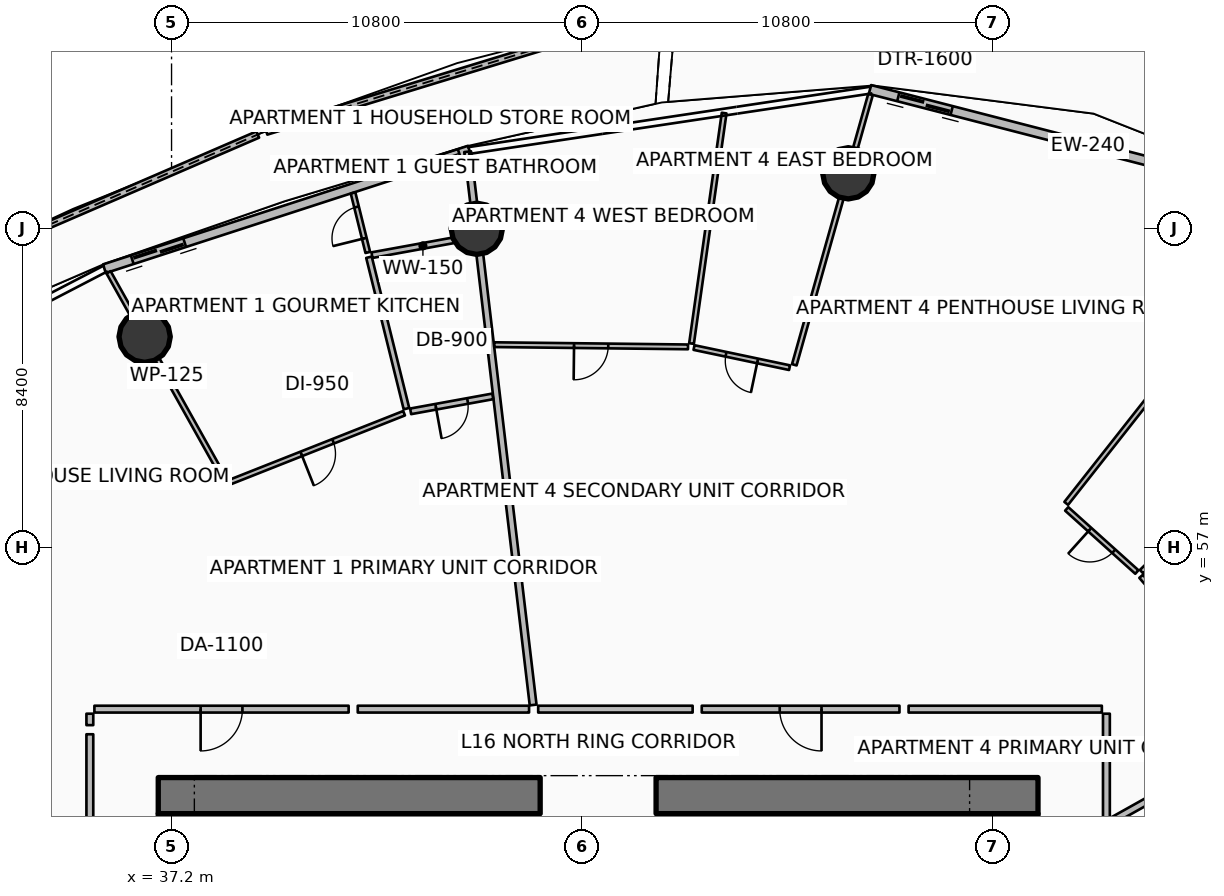
"""IFC4 building model, lengths in metres.
Left out: names, types, materials, properties, quantities, classifications, styles, units other than length and angle.
Written with IfcOpenShell. Run it as: python <this file> out.ifc"""

import sys

from ifc_helpers import new_model, si_unit, direction, frame, frame_2d, origin, origin_2d, place, context, subcontext, project, spatial, polyline, rectangle, circle, outline, extrude, element, fill, save


model = new_model("IFC4")
c1 = context("Model", 3, precision=1e-05, world=origin(), true_north=direction((0.0, 1.0)))
c2 = subcontext(c1, "Body", "Model", "MODEL_VIEW")
j1 = project(units=[si_unit("LENGTHUNIT", "METRE"), si_unit("PLANEANGLEUNIT", "RADIAN")], contexts=[c1])
p1 = place(None, origin())
s1 = spatial("IfcSite", under=j1, at=p1, CompositionType="ELEMENT")
p2 = place(p1, origin())
s2 = spatial("IfcBuilding", under=s1, at=p2, CompositionType="ELEMENT")
p3 = place(p2, frame((0.0, 0.0, 67.65)))
s3 = spatial("IfcBuildingStorey", under=s2, at=p3, CompositionType="ELEMENT", Elevation=67.65)
p4 = place(p3, frame((36.85, 50.475, 0.0), z_axis=(0.0, 0.0, 1.0), x_axis=(1.0, 0.0, 0.0)))
e1 = element("IfcWall", 1, at=p4, inside=s3, PredefinedType="SHEAR", context=c2, shape_type="SweptSolid", body=[
    extrude(rectangle(XDim=10.05, YDim=0.95, at=frame_2d((5.025, 0.0))), origin(), (0.0, 0.0, 1.0), 3.75),
])
p5 = place(p3, frame((49.95, 50.475, 0.0), z_axis=(0.0, 0.0, 1.0), x_axis=(1.0, 0.0, 0.0)))
e2 = element("IfcWall", 2, at=p5, inside=s3, PredefinedType="SHEAR", context=c2, shape_type="SweptSolid", body=[
    extrude(rectangle(XDim=10.05, YDim=0.95, at=frame_2d((5.025, 0.0))), origin(), (0.0, 0.0, 1.0), 3.75),
])
for number, where, z_axis, x_axis in (
    (3, (37.325, 34.0, 0.0), (0.0, 0.0, 1.0), (0.0, 1.0, 0.0)),
    (4, (59.525, 34.0, 0.0), (0.0, 0.0, 1.0), (0.0, 1.0, 0.0)),
):
    element("IfcWall", number, at=place(p3, frame(where, z_axis=z_axis, x_axis=x_axis)), inside=s3, PredefinedType="SHEAR", context=c2, shape_type="SweptSolid", body=[
        extrude(rectangle(XDim=16.0, YDim=0.95, at=frame_2d((8.0, 0.0))), origin(), (0.0, 0.0, 1.0), 3.75),
    ])
p6 = place(p3, frame((51.31, 46.5, 0.0), z_axis=(0.0, 0.0, 1.0), x_axis=(0.0, 1.0, 0.0)))
e5 = element("IfcWall", 5, at=p6, inside=s3, PredefinedType="SHEAR", context=c2, shape_type="SweptSolid", body=[
    extrude(rectangle(XDim=3.5, YDim=0.28, at=frame_2d((1.75, 0.0))), origin(), (0.0, 0.0, 1.0), 3.75),
])
for number, where, z_axis, x_axis in (
    (6, (55.008, 66.849, 0.0), (0.0, 0.0, 1.0), (1.0, 0.0, 0.0)),
    (7, (45.232, 65.389, 0.0), (0.0, 0.0, 1.0), (1.0, 0.0, 0.0)),
    (8, (36.492, 62.55, 0.0), (0.0, 0.0, 1.0), (1.0, 0.0, 0.0)),
):
    element("IfcColumn", number, at=place(p3, frame(where, z_axis=z_axis, x_axis=x_axis)), inside=s3, PredefinedType="COLUMN", context=c2, shape_type="SweptSolid", body=[
        extrude(circle(Radius=0.675, at=origin_2d()), origin(), (0.0, 0.0, 1.0), 3.35),
    ])
p7 = place(p3, frame((73.488, 64.039, 0.0), z_axis=(0.0, 0.0, 1.0), x_axis=(-0.851732671453, 0.523976579991, 0.0)))
e9 = element("IfcWall", 9, at=p7, inside=s3, PredefinedType="PARAPET", context=c2, shape_type="SweptSolid", body=[
    extrude(outline(polyline([(0.0, 0.0), (12.625, 0.0), (12.625, 1.832), (6.312, 1.696), (0.0, 1.497), (0.0, 0.0)])), frame((0.0, 0.09, 0.0), z_axis=(0.0, -1.0, 0.0), x_axis=(1.0, 0.0, 0.0)), (0.0, 0.0, 1.0), 0.18),
])
p8 = place(p3, frame((50.114, 71.14, 0.0), z_axis=(0.0, 0.0, 1.0), x_axis=(-0.956262130287, -0.292511090695, 0.0)))
e10 = element("IfcWall", 10, at=p8, inside=s3, PredefinedType="PARAPET", context=c2, shape_type="SweptSolid", body=[
    extrude(outline(polyline([(0.0, 0.0), (10.897, 0.0), (10.897, 1.348), (5.448, 1.562), (0.0, 1.747), (0.0, 0.0)])), frame((0.0, 0.09, 0.0), z_axis=(0.0, -1.0, 0.0), x_axis=(1.0, 0.0, 0.0)), (0.0, 0.0, 1.0), 0.18),
])
p9 = place(p3, frame((39.469, 67.87, 0.0), z_axis=(0.0, 0.0, 1.0), x_axis=(-0.91788240727, -0.396852474384, 0.0)))
e11 = element("IfcWall", 11, at=p9, inside=s3, PredefinedType="PARAPET", context=c2, shape_type="SweptSolid", body=[
    extrude(outline(polyline([(0.0, 0.0), (10.611, 0.0), (10.611, 1.12), (5.305, 1.182), (0.0, 1.348), (0.0, 0.0)])), frame((0.0, 0.09, 0.0), z_axis=(0.0, -1.0, 0.0), x_axis=(1.0, 0.0, 0.0)), (0.0, 0.0, 1.0), 0.18),
])
p10 = place(p3, frame((67.054, 66.096, 0.0), z_axis=(0.0, 0.0, 1.0), x_axis=(-0.96833871487, 0.249640007378, 0.0)))
e12 = element("IfcWall", 12, at=p10, inside=s3, PredefinedType="SOLIDWALL", context=c2, shape_type="SweptSolid", body=[
    extrude(rectangle(XDim=11.851, YDim=0.24, at=frame_2d((5.926, 0.0))), origin(), (0.0, 0.0, 1.0), 2.3),
])
p11 = place(p10, frame((9.631, 0.0, 0.0)))
e13 = element("IfcOpeningElement", 13, at=p11, cuts=e12, PredefinedType="OPENING", context=c2, shape_type="SweptSolid", body=[
    extrude(rectangle(XDim=1.45, YDim=2.15, at=frame_2d((0.725, 1.075))), frame((0.0, 0.13, 0.0), z_axis=(0.0, -1.0, 0.0), x_axis=(1.0, 0.0, 0.0)), (0.0, 0.0, 1.0), 0.26),
])
p12 = place(p10, frame((0.28, 0.0, 0.65)))
e14 = element("IfcOpeningElement", 14, at=p12, cuts=e12, PredefinedType="OPENING", context=c2, shape_type="SweptSolid", body=[
    extrude(rectangle(XDim=1.6, YDim=1.5, at=frame_2d((0.8, 0.75))), frame((0.0, 0.13, 0.0), z_axis=(0.0, -1.0, 0.0), x_axis=(1.0, 0.0, 0.0)), (0.0, 0.0, 1.0), 0.26),
])
p13 = place(p3, frame((45.036, 67.458, 0.0), z_axis=(0.0, 0.0, 1.0), x_axis=(-0.951054679225, -0.309022648238, 0.0)))
e15 = element("IfcWall", 15, at=p13, inside=s3, PredefinedType="SOLIDWALL", context=c2, shape_type="SweptSolid", body=[
    extrude(rectangle(XDim=10.097, YDim=0.24, at=frame_2d((5.048, 0.0))), origin(), (0.0, 0.0, 1.0), 2.3),
])
p14 = place(p13, frame((7.877, 0.0, 0.0)))
e16 = element("IfcOpeningElement", 16, at=p14, cuts=e15, PredefinedType="OPENING", context=c2, shape_type="SweptSolid", body=[
    extrude(rectangle(XDim=1.45, YDim=2.15, at=frame_2d((0.725, 1.075))), frame((0.0, 0.13, 0.0), z_axis=(0.0, -1.0, 0.0), x_axis=(1.0, 0.0, 0.0)), (0.0, 0.0, 1.0), 0.26),
])
p15 = place(p13, frame((0.28, 0.0, 0.65)))
e17 = element("IfcOpeningElement", 17, at=p15, cuts=e15, PredefinedType="OPENING", context=c2, shape_type="SweptSolid", body=[
    extrude(rectangle(XDim=1.6, YDim=1.5, at=frame_2d((0.8, 0.75))), frame((0.0, 0.13, 0.0), z_axis=(0.0, -1.0, 0.0), x_axis=(1.0, 0.0, 0.0)), (0.0, 0.0, 1.0), 0.26),
])
p16 = place(p3, frame((61.896, 49.782, 0.0), z_axis=(0.0, 0.0, 1.0), x_axis=(0.872493215695, 0.488626225828, 0.0)))
e18 = element("IfcWall", 18, at=p16, inside=s3, PredefinedType="PARTITIONING", context=c2, shape_type="SweptSolid", body=[
    extrude(rectangle(XDim=15.612, YDim=0.18, at=frame_2d((7.806, 0.0))), origin(), (0.0, 0.0, 1.0), 2.717),
])
p17 = place(p3, frame((46.715, 52.859, 0.0), z_axis=(0.0, 0.0, 1.0), x_axis=(-0.117534950089, 0.993068746617, 0.0)))
e19 = element("IfcWall", 19, at=p17, inside=s3, PredefinedType="PARTITIONING", context=c2, shape_type="SweptSolid", body=[
    extrude(rectangle(XDim=14.661, YDim=0.18, at=frame_2d((7.33, 0.0))), origin(), (0.0, 0.0, 1.0), 2.717),
])
p18 = place(p3, frame((41.86, 52.75, 0.0), z_axis=(0.0, 0.0, 1.0), x_axis=(-1.0, 0.0, 0.0)))
e20 = element("IfcWall", 20, at=p18, inside=s3, PredefinedType="PARTITIONING", context=c2, shape_type="SweptSolid", body=[
    extrude(rectangle(XDim=6.69, YDim=0.18, at=frame_2d((3.345, 0.0))), origin(), (0.0, 0.0, 1.0), 2.717),
])
p19 = place(p18, frame((2.795, 0.0, 0.0)))
e21 = element("IfcOpeningElement", 21, at=p19, cuts=e20, PredefinedType="OPENING", context=c2, shape_type="SweptSolid", body=[
    extrude(rectangle(XDim=1.1, YDim=2.1, at=frame_2d((0.55, 1.05))), frame((0.0, 0.1, 0.0), z_axis=(0.0, -1.0, 0.0), x_axis=(1.0, 0.0, 0.0)), (0.0, 0.0, 1.0), 0.2),
])
p20 = place(p3, frame((35.05, 52.63, 0.0), z_axis=(0.0, 0.0, 1.0), x_axis=(0.0, -1.0, 0.0)))
e22 = element("IfcWall", 22, at=p20, inside=s3, PredefinedType="PARTITIONING", context=c2, shape_type="SweptSolid", body=[
    extrude(rectangle(XDim=0.301, YDim=0.18, at=frame_2d((0.15, 0.0))), origin(), (0.0, 0.0, 1.0), 2.717),
])
p21 = place(p3, frame((46.608, 52.75, 0.0), z_axis=(0.0, 0.0, 1.0), x_axis=(-1.0, 0.0, 0.0)))
e23 = element("IfcWall", 23, at=p21, inside=s3, PredefinedType="PARTITIONING", context=c2, shape_type="SweptSolid", body=[
    extrude(rectangle(XDim=4.508, YDim=0.18, at=frame_2d((2.254, 0.0))), origin(), (0.0, 0.0, 1.0), 2.717),
])
p22 = place(p3, frame((38.604, 58.778, 0.0), z_axis=(0.0, 0.0, 1.0), x_axis=(-0.488617606889, 0.872498042541, 0.0)))
e24 = element("IfcWall", 24, at=p22, inside=s3, PredefinedType="PARTITIONING", context=c2, shape_type="SweptSolid", body=[
    extrude(rectangle(XDim=6.266, YDim=0.125, at=frame_2d((3.133, 0.0))), origin(), (0.0, 0.0, 1.0), 2.717),
])
p23 = place(p3, frame((45.653, 60.979, 0.0), z_axis=(0.0, 0.0, 1.0), x_axis=(-0.983791601568, -0.179315600783, 0.0)))
e25 = element("IfcWall", 25, at=p23, inside=s3, PredefinedType="PARTITIONING", context=c2, shape_type="SweptSolid", body=[
    extrude(rectangle(XDim=2.198, YDim=0.15, at=frame_2d((1.099, 0.0))), origin(), (0.0, 0.0, 1.0), 2.717),
])
p24 = place(p23, frame((0.674, 0.0, 0.0)))
e26 = element("IfcOpeningElement", 26, at=p24, cuts=e25, PredefinedType="OPENING", context=c2, shape_type="SweptSolid", body=[
    extrude(rectangle(XDim=0.85, YDim=2.06, at=frame_2d((0.425, 1.03))), frame((0.0, 0.085, 0.0), z_axis=(0.0, -1.0, 0.0), x_axis=(1.0, 0.0, 0.0)), (0.0, 0.0, 1.0), 0.17),
])
p25 = place(p3, frame((45.156, 65.184, 0.0), z_axis=(0.0, 0.0, 1.0), x_axis=(-0.983792433056, -0.179311038873, 0.0)))
e27 = element("IfcWall", 27, at=p25, inside=s3, PredefinedType="PARTITIONING", context=c2, shape_type="SweptSolid", body=[
    extrude(rectangle(XDim=2.726, YDim=0.15, at=frame_2d((1.363, 0.0))), origin(), (0.0, 0.0, 1.0), 2.717),
])
p26 = place(p3, frame((43.381, 60.657, 0.0), z_axis=(0.0, 0.0, 1.0), x_axis=(-0.240281337946, 0.97070329073, 0.0)))
e28 = element("IfcWall", 28, at=p26, inside=s3, PredefinedType="PARTITIONING", context=c2, shape_type="SweptSolid", body=[
    extrude(rectangle(XDim=4.104, YDim=0.15, at=frame_2d((2.052, 0.0))), origin(), (0.0, 0.0, 1.0), 2.79),
])
p27 = place(p3, frame((42.364, 64.767, 0.0), z_axis=(0.0, 0.0, 1.0), x_axis=(-0.240399183991, 0.970674112324, 0.0)))
e29 = element("IfcWall", 29, at=p27, inside=s3, PredefinedType="PARTITIONING", context=c2, shape_type="SweptSolid", body=[
    extrude(rectangle(XDim=1.614, YDim=0.125, at=frame_2d((0.807, 0.0))), origin(), (0.0, 0.0, 1.0), 2.79),
])
p28 = place(p27, frame((0.382, 0.0, 0.0)))
e30 = element("IfcOpeningElement", 30, at=p28, cuts=e29, PredefinedType="OPENING", context=c2, shape_type="SweptSolid", body=[
    extrude(rectangle(XDim=0.85, YDim=2.06, at=frame_2d((0.425, 1.03))), frame((0.0, 0.073, 0.0), z_axis=(0.0, -1.0, 0.0), x_axis=(1.0, 0.0, 0.0)), (0.0, 0.0, 1.0), 0.145),
])
p29 = place(p3, frame((43.319, 60.536, 0.0), z_axis=(0.0, 0.0, 1.0), x_axis=(-0.929910978534, -0.367784681576, 0.0)))
e31 = element("IfcWall", 31, at=p29, inside=s3, PredefinedType="PARTITIONING", context=c2, shape_type="SweptSolid", body=[
    extrude(rectangle(XDim=4.918, YDim=0.125, at=frame_2d((2.459, 0.0))), origin(), (0.0, 0.0, 1.0), 2.717),
])
p30 = place(p29, frame((2.009, 0.0, 0.0)))
e32 = element("IfcOpeningElement", 32, at=p30, cuts=e31, PredefinedType="OPENING", context=c2, shape_type="SweptSolid", body=[
    extrude(rectangle(XDim=0.9, YDim=2.08, at=frame_2d((0.45, 1.04))), frame((0.0, 0.073, 0.0), z_axis=(0.0, -1.0, 0.0), x_axis=(1.0, 0.0, 0.0)), (0.0, 0.0, 1.0), 0.145),
])
p31 = place(p3, frame((35.05, 52.089, 0.0), z_axis=(0.0, 0.0, 1.0), x_axis=(0.0, -1.0, 0.0)))
e33 = element("IfcWall", 33, at=p31, inside=s3, PredefinedType="PARTITIONING", context=c2, shape_type="SweptSolid", body=[
    extrude(rectangle(XDim=6.317, YDim=0.18, at=frame_2d((3.158, 0.0))), origin(), (0.0, 0.0, 1.0), 2.717),
])
p32 = place(p3, frame((56.354, 52.75, 0.0), z_axis=(0.0, 0.0, 1.0), x_axis=(-1.0, 0.0, 0.0)))
e34 = element("IfcWall", 34, at=p32, inside=s3, PredefinedType="PARTITIONING", context=c2, shape_type="SweptSolid", body=[
    extrude(rectangle(XDim=5.203, YDim=0.18, at=frame_2d((2.601, 0.0))), origin(), (0.0, 0.0, 1.0), 2.717),
])
p33 = place(p32, frame((2.052, 0.0, 0.0)))
e35 = element("IfcOpeningElement", 35, at=p33, cuts=e34, PredefinedType="OPENING", context=c2, shape_type="SweptSolid", body=[
    extrude(rectangle(XDim=1.1, YDim=2.1, at=frame_2d((0.55, 1.05))), frame((0.0, 0.1, 0.0), z_axis=(0.0, -1.0, 0.0), x_axis=(1.0, 0.0, 0.0)), (0.0, 0.0, 1.0), 0.2),
])
p34 = place(p3, frame((61.8, 49.848, 0.0), z_axis=(0.0, 0.0, 1.0), x_axis=(0.0, 1.0, 0.0)))
e36 = element("IfcWall", 36, at=p34, inside=s3, PredefinedType="PARTITIONING", context=c2, shape_type="SweptSolid", body=[
    extrude(rectangle(XDim=2.781, YDim=0.18, at=frame_2d((1.391, 0.0))), origin(), (0.0, 0.0, 1.0), 2.717),
])
p35 = place(p3, frame((61.68, 52.75, 0.0), z_axis=(0.0, 0.0, 1.0), x_axis=(-1.0, 0.0, 0.0)))
e37 = element("IfcWall", 37, at=p35, inside=s3, PredefinedType="PARTITIONING", context=c2, shape_type="SweptSolid", body=[
    extrude(rectangle(XDim=5.085, YDim=0.18, at=frame_2d((2.543, 0.0))), origin(), (0.0, 0.0, 1.0), 2.717),
])
p36 = place(p3, frame((60.743, 58.164, 0.0), z_axis=(0.0, 0.0, 1.0), x_axis=(0.61907620874, 0.785330916093, 0.0)))
e38 = element("IfcWall", 38, at=p36, inside=s3, PredefinedType="PARTITIONING", context=c2, shape_type="SweptSolid", body=[
    extrude(rectangle(XDim=10.091, YDim=0.125, at=frame_2d((5.046, 0.0))), origin(), (0.0, 0.0, 1.0), 2.717),
])
p37 = place(p3, frame((62.725, 56.368, 0.0), z_axis=(0.0, 0.0, 1.0), x_axis=(0.715749552764, 0.698357056038, 0.0)))
e39 = element("IfcWall", 39, at=p37, inside=s3, PredefinedType="PARTITIONING", context=c2, shape_type="SweptSolid", body=[
    extrude(rectangle(XDim=10.107, YDim=0.125, at=frame_2d((5.053, 0.0))), origin(), (0.0, 0.0, 1.0), 2.79),
])
p38 = place(p3, frame((64.18, 54.552, 0.0), z_axis=(0.0, 0.0, 1.0), x_axis=(-0.654947139149, 0.75567469517, 0.0)))
e40 = element("IfcWall", 40, at=p38, inside=s3, PredefinedType="PARTITIONING", context=c2, shape_type="SweptSolid", body=[
    extrude(rectangle(XDim=2.24, YDim=0.125, at=frame_2d((1.12, 0.0))), origin(), (0.0, 0.0, 1.0), 2.79),
])
p39 = place(p38, frame((0.695, 0.0, 0.0)))
e41 = element("IfcOpeningElement", 41, at=p39, cuts=e40, PredefinedType="OPENING", context=c2, shape_type="SweptSolid", body=[
    extrude(rectangle(XDim=0.85, YDim=2.06, at=frame_2d((0.425, 1.03))), frame((0.0, 0.073, 0.0), z_axis=(0.0, -1.0, 0.0), x_axis=(1.0, 0.0, 0.0)), (0.0, 0.0, 1.0), 0.145),
])
p40 = place(p3, frame((62.601, 56.358, 0.0), z_axis=(0.0, 0.0, 1.0), x_axis=(-0.743435913228, 0.66880717918, 0.0)))
e42 = element("IfcWall", 42, at=p40, inside=s3, PredefinedType="PARTITIONING", context=c2, shape_type="SweptSolid", body=[
    extrude(rectangle(XDim=2.483, YDim=0.125, at=frame_2d((1.241, 0.0))), origin(), (0.0, 0.0, 1.0), 2.717),
])
p41 = place(p40, frame((0.816, 0.0, 0.0)))
e43 = element("IfcOpeningElement", 43, at=p41, cuts=e42, PredefinedType="OPENING", context=c2, shape_type="SweptSolid", body=[
    extrude(rectangle(XDim=0.85, YDim=2.06, at=frame_2d((0.425, 1.03))), frame((0.0, 0.073, 0.0), z_axis=(0.0, -1.0, 0.0), x_axis=(1.0, 0.0, 0.0)), (0.0, 0.0, 1.0), 0.145),
])
p42 = place(p3, frame((50.912, 52.75, 0.0), z_axis=(0.0, 0.0, 1.0), x_axis=(-1.0, 0.0, 0.0)))
e44 = element("IfcWall", 44, at=p42, inside=s3, PredefinedType="PARTITIONING", context=c2, shape_type="SweptSolid", body=[
    extrude(rectangle(XDim=4.064, YDim=0.18, at=frame_2d((2.032, 0.0))), origin(), (0.0, 0.0, 1.0), 2.717),
])
p43 = place(p3, frame((53.587, 61.81, 0.0), z_axis=(0.0, 0.0, 1.0), x_axis=(0.271464088879, 0.962448569249, 0.0)))
e45 = element("IfcWall", 45, at=p43, inside=s3, PredefinedType="PARTITIONING", context=c2, shape_type="SweptSolid", body=[
    extrude(rectangle(XDim=7.389, YDim=0.125, at=frame_2d((3.695, 0.0))), origin(), (0.0, 0.0, 1.0), 2.717),
])
p44 = place(p3, frame((50.883, 62.37, 0.0), z_axis=(0.0, 0.0, 1.0), x_axis=(0.140126411414, 0.990133621702, 0.0)))
e46 = element("IfcWall", 46, at=p44, inside=s3, PredefinedType="PARTITIONING", context=c2, shape_type="SweptSolid", body=[
    extrude(rectangle(XDim=6.124, YDim=0.125, at=frame_2d((3.062, 0.0))), origin(), (0.0, 0.0, 1.0), 2.79),
])
p45 = place(p3, frame((53.462, 61.735, 0.0), z_axis=(0.0, 0.0, 1.0), x_axis=(-0.978499333356, 0.206249980902, 0.0)))
e47 = element("IfcWall", 47, at=p45, inside=s3, PredefinedType="PARTITIONING", context=c2, shape_type="SweptSolid", body=[
    extrude(rectangle(XDim=2.569, YDim=0.125, at=frame_2d((1.284, 0.0))), origin(), (0.0, 0.0, 1.0), 2.717),
])
p46 = place(p45, frame((0.859, 0.0, 0.0)))
e48 = element("IfcOpeningElement", 48, at=p46, cuts=e47, PredefinedType="OPENING", context=c2, shape_type="SweptSolid", body=[
    extrude(rectangle(XDim=0.85, YDim=2.06, at=frame_2d((0.425, 1.03))), frame((0.0, 0.073, 0.0), z_axis=(0.0, -1.0, 0.0), x_axis=(1.0, 0.0, 0.0)), (0.0, 0.0, 1.0), 0.145),
])
p47 = place(p3, frame((50.79, 62.282, 0.0), z_axis=(0.0, 0.0, 1.0), x_axis=(-0.99993505002, 0.011397181261, 0.0)))
e49 = element("IfcWall", 49, at=p47, inside=s3, PredefinedType="PARTITIONING", context=c2, shape_type="SweptSolid", body=[
    extrude(rectangle(XDim=5.098, YDim=0.125, at=frame_2d((2.549, 0.0))), origin(), (0.0, 0.0, 1.0), 2.717),
])
p48 = place(p47, frame((2.099, 0.0, 0.0)))
e50 = element("IfcOpeningElement", 50, at=p48, cuts=e49, PredefinedType="OPENING", context=c2, shape_type="SweptSolid", body=[
    extrude(rectangle(XDim=0.9, YDim=2.08, at=frame_2d((0.45, 1.04))), frame((0.0, 0.073, 0.0), z_axis=(0.0, -1.0, 0.0), x_axis=(1.0, 0.0, 0.0)), (0.0, 0.0, 1.0), 0.145),
])
p49 = place(p11, origin())
e51 = element("IfcDoor", 51, at=p49, inside=s3, OperationType="DOUBLE_DOOR_SLIDING", PredefinedType="DOOR", context=c2, shape_type="SweptSolid", body=[
    extrude(rectangle(XDim=1.45, YDim=2.15, at=frame_2d((0.725, 1.075))), frame((0.0, 0.025, 0.0), z_axis=(0.0, -1.0, 0.0), x_axis=(1.0, 0.0, 0.0)), (0.0, 0.0, 1.0), 0.05),
])
fill(e13, e51)
p50 = place(p14, origin())
e52 = element("IfcDoor", 52, at=p50, inside=s3, OperationType="DOUBLE_DOOR_SLIDING", PredefinedType="DOOR", context=c2, shape_type="SweptSolid", body=[
    extrude(rectangle(XDim=1.45, YDim=2.15, at=frame_2d((0.725, 1.075))), frame((0.0, 0.025, 0.0), z_axis=(0.0, -1.0, 0.0), x_axis=(1.0, 0.0, 0.0)), (0.0, 0.0, 1.0), 0.05),
])
fill(e16, e52)
p51 = place(p15, origin())
e53 = element("IfcWindow", 53, at=p51, inside=s3, PartitioningType="SINGLE_PANEL", PredefinedType="WINDOW", context=c2, shape_type="SweptSolid", body=[
    extrude(rectangle(XDim=1.6, YDim=1.5, at=frame_2d((0.8, 0.75))), frame((0.0, 0.03, 0.0), z_axis=(0.0, -1.0, 0.0), x_axis=(1.0, 0.0, 0.0)), (0.0, 0.0, 1.0), 0.06),
])
fill(e17, e53)
p52 = place(p19, origin())
e54 = element("IfcDoor", 54, at=p52, inside=s3, OperationType="SINGLE_SWING_RIGHT", PredefinedType="DOOR", context=c2, shape_type="SweptSolid", body=[
    extrude(rectangle(XDim=1.1, YDim=2.1, at=frame_2d((0.55, 1.05))), frame((0.0, 0.025, 0.0), z_axis=(0.0, -1.0, 0.0), x_axis=(1.0, 0.0, 0.0)), (0.0, 0.0, 1.0), 0.05),
])
fill(e21, e54)
p53 = place(p24, origin())
e55 = element("IfcDoor", 55, at=p53, inside=s3, OperationType="SINGLE_SWING_RIGHT", PredefinedType="DOOR", context=c2, shape_type="SweptSolid", body=[
    extrude(rectangle(XDim=0.85, YDim=2.06, at=frame_2d((0.425, 1.03))), frame((0.0, 0.025, 0.0), z_axis=(0.0, -1.0, 0.0), x_axis=(1.0, 0.0, 0.0)), (0.0, 0.0, 1.0), 0.05),
])
fill(e26, e55)
p54 = place(p28, origin())
e56 = element("IfcDoor", 56, at=p54, inside=s3, OperationType="SINGLE_SWING_LEFT", PredefinedType="DOOR", context=c2, shape_type="SweptSolid", body=[
    extrude(rectangle(XDim=0.85, YDim=2.06, at=frame_2d((0.425, 1.03))), frame((0.0, 0.025, 0.0), z_axis=(0.0, -1.0, 0.0), x_axis=(1.0, 0.0, 0.0)), (0.0, 0.0, 1.0), 0.05),
])
fill(e30, e56)
p55 = place(p30, origin())
e57 = element("IfcDoor", 57, at=p55, inside=s3, OperationType="SINGLE_SWING_RIGHT", PredefinedType="DOOR", context=c2, shape_type="SweptSolid", body=[
    extrude(rectangle(XDim=0.9, YDim=2.08, at=frame_2d((0.45, 1.04))), frame((0.0, 0.025, 0.0), z_axis=(0.0, -1.0, 0.0), x_axis=(1.0, 0.0, 0.0)), (0.0, 0.0, 1.0), 0.05),
])
fill(e32, e57)
p56 = place(p33, origin())
e58 = element("IfcDoor", 58, at=p56, inside=s3, OperationType="SINGLE_SWING_LEFT", PredefinedType="DOOR", context=c2, shape_type="SweptSolid", body=[
    extrude(rectangle(XDim=1.1, YDim=2.1, at=frame_2d((0.55, 1.05))), frame((0.0, 0.025, 0.0), z_axis=(0.0, -1.0, 0.0), x_axis=(1.0, 0.0, 0.0)), (0.0, 0.0, 1.0), 0.05),
])
fill(e35, e58)
p57 = place(p41, origin())
e59 = element("IfcDoor", 59, at=p57, inside=s3, OperationType="SINGLE_SWING_RIGHT", PredefinedType="DOOR", context=c2, shape_type="SweptSolid", body=[
    extrude(rectangle(XDim=0.85, YDim=2.06, at=frame_2d((0.425, 1.03))), frame((0.0, 0.025, 0.0), z_axis=(0.0, -1.0, 0.0), x_axis=(1.0, 0.0, 0.0)), (0.0, 0.0, 1.0), 0.05),
])
fill(e43, e59)
p58 = place(p46, origin())
e60 = element("IfcDoor", 60, at=p58, inside=s3, OperationType="SINGLE_SWING_LEFT", PredefinedType="DOOR", context=c2, shape_type="SweptSolid", body=[
    extrude(rectangle(XDim=0.85, YDim=2.06, at=frame_2d((0.425, 1.03))), frame((0.0, 0.025, 0.0), z_axis=(0.0, -1.0, 0.0), x_axis=(1.0, 0.0, 0.0)), (0.0, 0.0, 1.0), 0.05),
])
fill(e48, e60)
p59 = place(p48, origin())
e61 = element("IfcDoor", 61, at=p59, inside=s3, OperationType="SINGLE_SWING_RIGHT", PredefinedType="DOOR", context=c2, shape_type="SweptSolid", body=[
    extrude(rectangle(XDim=0.9, YDim=2.08, at=frame_2d((0.45, 1.04))), frame((0.0, 0.025, 0.0), z_axis=(0.0, -1.0, 0.0), x_axis=(1.0, 0.0, 0.0)), (0.0, 0.0, 1.0), 0.05),
])
fill(e50, e61)
save(model, sys.argv[1])
